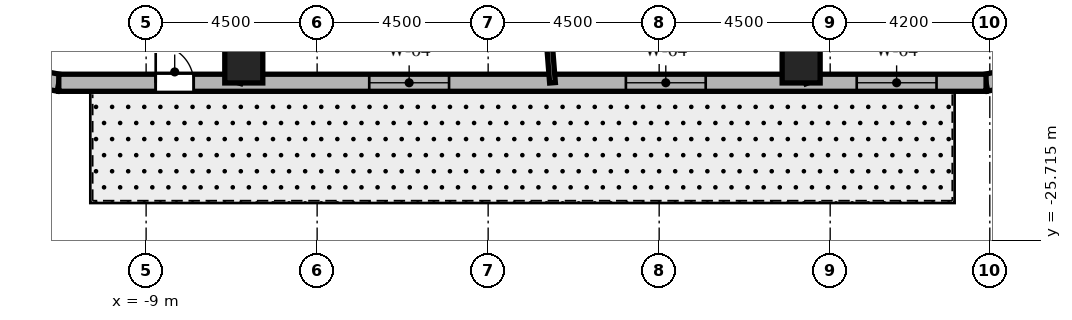
"""IFC4 building model, lengths in metres.
Left out: names, types, materials, properties, quantities, classifications, styles, units other than length and angle.
Written with IfcOpenShell. Run it as: python <this file> out.ifc"""

import sys

from ifc_helpers import new_model, si_unit, direction, frame, frame_2d, origin, origin_2d, place, context, subcontext, project, spatial, rectangle, extrude, element, fill, save


model = new_model("IFC4")
c1 = context("Model", 3, precision=1e-05, world=origin(), true_north=direction((0.0, 1.0)))
c2 = subcontext(c1, "Body", "Model", "MODEL_VIEW")
j1 = project(units=[si_unit("LENGTHUNIT", "METRE"), si_unit("PLANEANGLEUNIT", "RADIAN")], contexts=[c1])
p1 = place(None, origin())
s1 = spatial("IfcSite", under=j1, at=p1, CompositionType="ELEMENT")
p2 = place(p1, origin())
s2 = spatial("IfcBuilding", under=s1, at=p2, CompositionType="ELEMENT")
p3 = place(p2, frame((0.0, 0.0, 248.3)))
s3 = spatial("IfcBuildingStorey", under=s2, at=p3, CompositionType="ELEMENT", Elevation=248.3)
for number, where, z_axis, x_axis in (
    (1, (-6.43, -21.08, 0.0), (0.0, 0.0, 1.0), (1.0, 0.0, 0.0)),
    (2, (8.236, -21.08, 0.0), (0.0, 0.0, 1.0), (1.0, 0.0, 0.0)),
):
    element("IfcColumn", number, at=place(p3, frame(where, z_axis=z_axis, x_axis=x_axis)), inside=s3, PredefinedType="COLUMN", context=c2, shape_type="SweptSolid", body=[
        extrude(rectangle(XDim=1.0, YDim=1.0, at=origin_2d()), origin(), (0.0, 0.0, 1.0), 3.8),
    ])
p4 = place(p3, frame((-12.546, -21.34, 0.0), z_axis=(0.0, 0.0, 1.0), x_axis=(0.982686750835, -0.18527479519, 0.0)))
e3 = element("IfcWall", 3, at=p4, inside=s3, PredefinedType="SOLIDWALL", context=c2, shape_type="SweptSolid", body=[
    extrude(rectangle(XDim=1.27, YDim=0.45, at=frame_2d((0.635, 0.0))), origin(), (0.0, 0.0, 1.0), 3.5),
])
p5 = place(p3, frame((13.102, -21.575, 0.0), z_axis=(0.0, 0.0, 1.0), x_axis=(0.978757421505, 0.205021730188, 0.0)))
e4 = element("IfcWall", 4, at=p5, inside=s3, PredefinedType="SOLIDWALL", context=c2, shape_type="SweptSolid", body=[
    extrude(rectangle(XDim=1.406, YDim=0.45, at=frame_2d((0.703, 0.0))), origin(), (0.0, 0.0, 1.0), 3.5),
])
p6 = place(p3, frame((-11.298, -21.575, 0.0), z_axis=(0.0, 0.0, 1.0), x_axis=(1.0, 0.0, 0.0)))
e5 = element("IfcWall", 5, at=p6, inside=s3, PredefinedType="SOLIDWALL", context=c2, shape_type="SweptSolid", body=[
    extrude(rectangle(XDim=24.399, YDim=0.45, at=frame_2d((12.2, 0.0))), origin(), (0.0, 0.0, 1.0), 3.5),
])
p7 = place(p6, frame((2.55, 0.0, 0.0)))
e6 = element("IfcOpeningElement", 6, at=p7, cuts=e5, PredefinedType="OPENING", context=c2, shape_type="SweptSolid", body=[
    extrude(rectangle(XDim=1.0, YDim=2.15, at=frame_2d((0.5, 1.075))), frame((0.0, 0.235, 0.0), z_axis=(0.0, -1.0, 0.0), x_axis=(1.0, 0.0, 0.0)), (0.0, 0.0, 1.0), 0.47),
])
p8 = place(p6, frame((8.169, 0.0, 0.8)))
e7 = element("IfcOpeningElement", 7, at=p8, cuts=e5, PredefinedType="OPENING", context=c2, shape_type="SweptSolid", body=[
    extrude(rectangle(XDim=2.1, YDim=1.85, at=frame_2d((1.05, 0.925))), frame((0.0, 0.235, 0.0), z_axis=(0.0, -1.0, 0.0), x_axis=(1.0, 0.0, 0.0)), (0.0, 0.0, 1.0), 0.47),
])
p9 = place(p6, frame((14.922, 0.0, 0.8)))
e8 = element("IfcOpeningElement", 8, at=p9, cuts=e5, PredefinedType="OPENING", context=c2, shape_type="SweptSolid", body=[
    extrude(rectangle(XDim=2.1, YDim=1.85, at=frame_2d((1.05, 0.925))), frame((0.0, 0.235, 0.0), z_axis=(0.0, -1.0, 0.0), x_axis=(1.0, 0.0, 0.0)), (0.0, 0.0, 1.0), 0.47),
])
p10 = place(p6, frame((20.996, 0.0, 0.8)))
e9 = element("IfcOpeningElement", 9, at=p10, cuts=e5, PredefinedType="OPENING", context=c2, shape_type="SweptSolid", body=[
    extrude(rectangle(XDim=2.1, YDim=1.85, at=frame_2d((1.05, 0.925))), frame((0.0, 0.235, 0.0), z_axis=(0.0, -1.0, 0.0), x_axis=(1.0, 0.0, 0.0)), (0.0, 0.0, 1.0), 0.47),
])
p11 = place(p3, frame((-3.004, -9.85, 0.0), z_axis=(0.0, 0.0, 1.0), x_axis=(-0.291775760688, -0.956486751333, 0.0)))
e10 = element("IfcWall", 10, at=p11, inside=s3, PredefinedType="PARTITIONING", context=c2, shape_type="SweptSolid", body=[
    extrude(rectangle(XDim=12.258, YDim=0.15, at=frame_2d((6.129, 0.0))), origin(), (0.0, 0.0, 1.0), 2.74),
])
p12 = place(p3, frame((1.1, -14.018, 0.0), z_axis=(0.0, 0.0, 1.0), x_axis=(0.078228275349, -0.996935472804, 0.0)))
e11 = element("IfcWall", 11, at=p12, inside=s3, PredefinedType="PARTITIONING", context=c2, shape_type="SweptSolid", body=[
    extrude(rectangle(XDim=7.581, YDim=0.15, at=frame_2d((3.79, 0.0))), origin(), (0.0, 0.0, 1.0), 2.74),
])
p13 = place(p3, frame((3.848, -9.85, 0.0), z_axis=(0.0, 0.0, 1.0), x_axis=(0.363921778212, -0.931429513889, 0.0)))
e12 = element("IfcWall", 12, at=p13, inside=s3, PredefinedType="PARTITIONING", context=c2, shape_type="SweptSolid", body=[
    extrude(rectangle(XDim=12.588, YDim=0.15, at=frame_2d((6.294, 0.0))), origin(), (0.0, 0.0, 1.0), 2.74),
])
p14 = place(p7, origin())
e13 = element("IfcDoor", 13, at=p14, inside=s3, OperationType="SINGLE_SWING_LEFT", PredefinedType="DOOR", context=c2, shape_type="SweptSolid", body=[
    extrude(rectangle(XDim=1.0, YDim=2.15, at=frame_2d((0.5, 1.075))), frame((0.0, 0.025, 0.0), z_axis=(0.0, -1.0, 0.0), x_axis=(1.0, 0.0, 0.0)), (0.0, 0.0, 1.0), 0.05),
])
fill(e6, e13)
p15 = place(p8, origin())
e14 = element("IfcWindow", 14, at=p15, inside=s3, PartitioningType="SINGLE_PANEL", PredefinedType="WINDOW", context=c2, shape_type="SweptSolid", body=[
    extrude(rectangle(XDim=2.1, YDim=1.85, at=frame_2d((1.05, 0.925))), frame((0.0, 0.03, 0.0), z_axis=(0.0, -1.0, 0.0), x_axis=(1.0, 0.0, 0.0)), (0.0, 0.0, 1.0), 0.06),
])
fill(e7, e14)
p16 = place(p9, origin())
e15 = element("IfcWindow", 15, at=p16, inside=s3, PartitioningType="SINGLE_PANEL", PredefinedType="WINDOW", context=c2, shape_type="SweptSolid", body=[
    extrude(rectangle(XDim=2.1, YDim=1.85, at=frame_2d((1.05, 0.925))), frame((0.0, 0.03, 0.0), z_axis=(0.0, -1.0, 0.0), x_axis=(1.0, 0.0, 0.0)), (0.0, 0.0, 1.0), 0.06),
])
fill(e8, e15)
p17 = place(p10, origin())
e16 = element("IfcWindow", 16, at=p17, inside=s3, PartitioningType="SINGLE_PANEL", PredefinedType="WINDOW", context=c2, shape_type="SweptSolid", body=[
    extrude(rectangle(XDim=2.1, YDim=1.85, at=frame_2d((1.05, 0.925))), frame((0.0, 0.03, 0.0), z_axis=(0.0, -1.0, 0.0), x_axis=(1.0, 0.0, 0.0)), (0.0, 0.0, 1.0), 0.06),
])
fill(e9, e16)
save(model, sys.argv[1])
